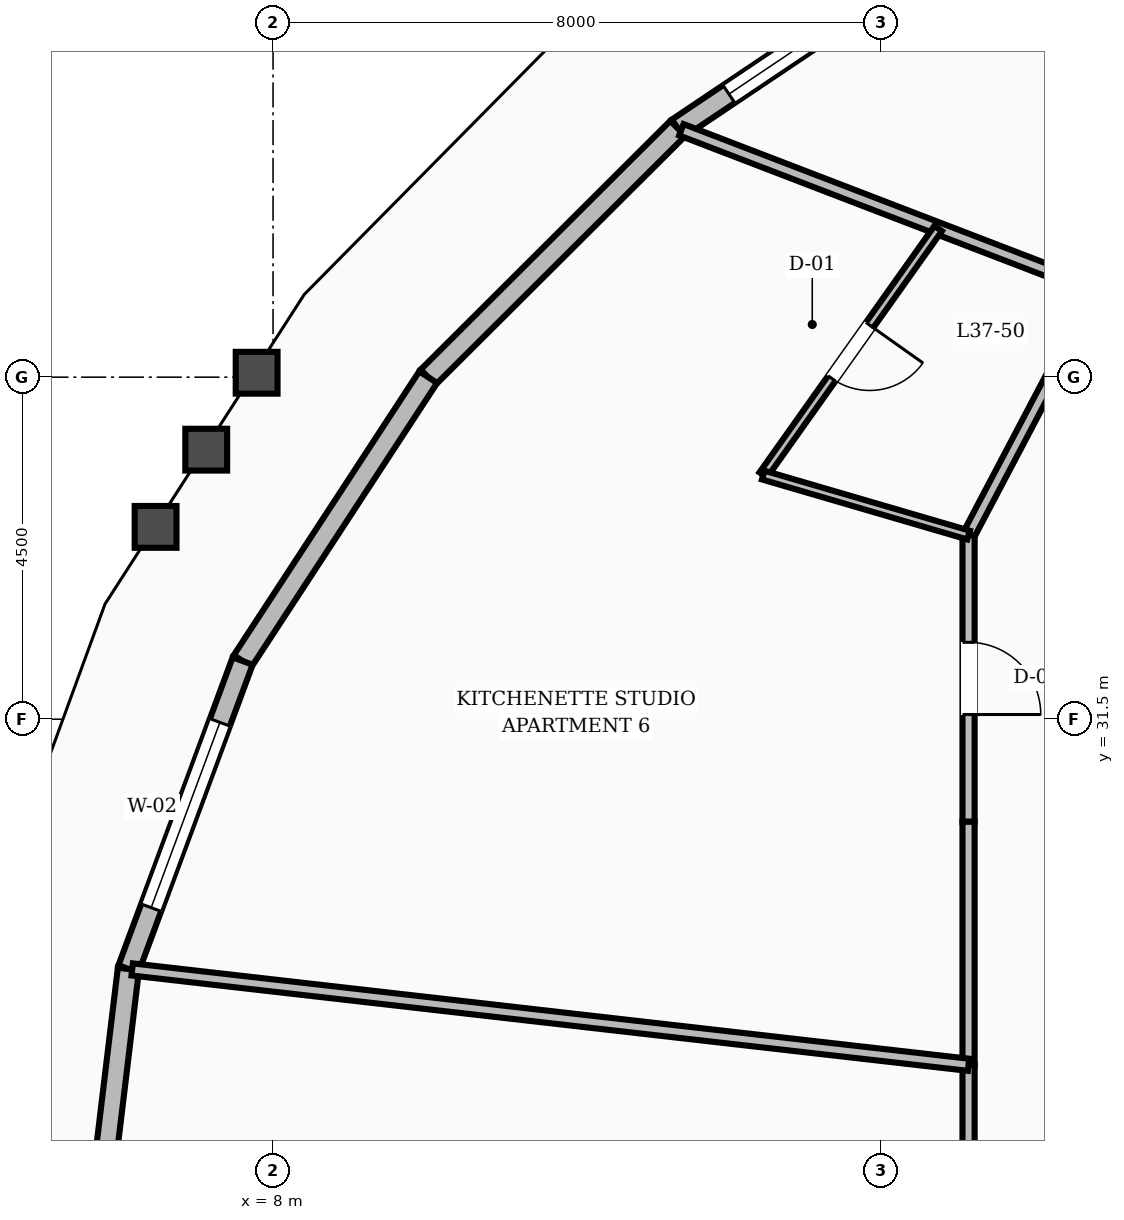
"""IFC4 building model, lengths in metres.
Left out: names, types, materials, properties, quantities, classifications, styles, units other than length and angle.
Written with IfcOpenShell. Run it as: python <this file> out.ifc"""

import sys

from ifc_helpers import new_model, si_unit, direction, frame, frame_2d, origin, place, context, subcontext, project, spatial, rectangle, extrude, element, fill, save


model = new_model("IFC4")
c1 = context("Model", 3, precision=1e-05, world=origin(), true_north=direction((0.0, 1.0)))
c2 = subcontext(c1, "Body", "Model", "MODEL_VIEW")
j1 = project(units=[si_unit("LENGTHUNIT", "METRE"), si_unit("PLANEANGLEUNIT", "RADIAN")], contexts=[c1])
p1 = place(None, origin())
s1 = spatial("IfcSite", under=j1, at=p1, CompositionType="ELEMENT")
p2 = place(p1, origin())
s2 = spatial("IfcBuilding", under=s1, at=p2, CompositionType="ELEMENT")
p3 = place(p2, frame((0.0, 0.0, 146.0)))
s3 = spatial("IfcBuildingStorey", under=s2, at=p3, CompositionType="ELEMENT", Elevation=146.0)
p4 = place(p3, frame((17.327, 41.959, 0.0), z_axis=(0.0, 0.0, 1.0), x_axis=(-0.830308520581, -0.557304010977, 0.0)))
e1 = element("IfcWall", 1, at=p4, inside=s3, PredefinedType="STANDARD", context=c2, shape_type="SweptSolid", body=[
    extrude(rectangle(XDim=4.82, YDim=0.28, at=frame_2d((2.41, 0.0))), origin(), (0.0, 0.0, 1.0), 2.82),
])
p5 = place(p4, frame((0.81, 0.0, 0.8)))
e2 = element("IfcOpeningElement", 2, at=p5, cuts=e1, PredefinedType="OPENING", context=c2, shape_type="SweptSolid", body=[
    extrude(rectangle(XDim=3.2, YDim=1.65, at=frame_2d((1.6, 0.825))), frame((0.0, 0.15, 0.0), z_axis=(0.0, -1.0, 0.0), x_axis=(1.0, 0.0, 0.0)), (0.0, 0.0, 1.0), 0.3),
])
p6 = place(p3, frame((13.325, 39.273, 0.0), z_axis=(0.0, 0.0, 1.0), x_axis=(-0.708343047993, -0.70586834917, 0.0)))
e3 = element("IfcWall", 3, at=p6, inside=s3, PredefinedType="STANDARD", context=c2, shape_type="SweptSolid", body=[
    extrude(rectangle(XDim=4.637, YDim=0.28, at=frame_2d((2.318, 0.0))), origin(), (0.0, 0.0, 1.0), 2.82),
])
p7 = place(p3, frame((10.041, 36.0, 0.0), z_axis=(0.0, 0.0, 1.0), x_axis=(-0.547087162156, -0.837075645927, 0.0)))
e4 = element("IfcWall", 4, at=p7, inside=s3, PredefinedType="STANDARD", context=c2, shape_type="SweptSolid", body=[
    extrude(rectangle(XDim=4.461, YDim=0.28, at=frame_2d((2.23, 0.0))), origin(), (0.0, 0.0, 1.0), 2.82),
])
p8 = place(p3, frame((7.6, 32.266, 0.0), z_axis=(0.0, 0.0, 1.0), x_axis=(-0.347777987911, -0.937576914778, 0.0)))
e5 = element("IfcWall", 5, at=p8, inside=s3, PredefinedType="STANDARD", context=c2, shape_type="SweptSolid", body=[
    extrude(rectangle(XDim=4.322, YDim=0.28, at=frame_2d((2.161, 0.0))), origin(), (0.0, 0.0, 1.0), 2.82),
])
p9 = place(p8, frame((0.861, 0.0, 0.8)))
e6 = element("IfcOpeningElement", 6, at=p9, cuts=e5, PredefinedType="OPENING", context=c2, shape_type="SweptSolid", body=[
    extrude(rectangle(XDim=2.6, YDim=1.65, at=frame_2d((1.3, 0.825))), frame((0.0, 0.15, 0.0), z_axis=(0.0, -1.0, 0.0), x_axis=(1.0, 0.0, 0.0)), (0.0, 0.0, 1.0), 0.3),
])
p10 = place(p3, frame((6.097, 28.214, 0.0), z_axis=(0.0, 0.0, 1.0), x_axis=(-0.119530808936, -0.992830491935, 0.0)))
e7 = element("IfcWall", 7, at=p10, inside=s3, PredefinedType="STANDARD", context=c2, shape_type="SweptSolid", body=[
    extrude(rectangle(XDim=4.244, YDim=0.28, at=frame_2d((2.122, 0.0))), origin(), (0.0, 0.0, 1.0), 2.82),
])
p11 = place(p3, frame((18.85, 37.15, 0.0), z_axis=(0.0, 0.0, 1.0), x_axis=(-0.466093963429, -0.884735224378, 0.0)))
e8 = element("IfcWall", 8, at=p11, inside=s3, PredefinedType="SOLIDWALL", context=c2, shape_type="SweptSolid", body=[
    extrude(rectangle(XDim=3.648, YDim=0.16, at=frame_2d((1.824, 0.0))), origin(), (0.0, 0.0, 1.0), 2.8),
])
p12 = place(p3, frame((17.15, 33.923, 0.0), z_axis=(0.0, 0.0, 1.0), x_axis=(0.0, -1.0, 0.0)))
e9 = element("IfcWall", 9, at=p12, inside=s3, PredefinedType="SOLIDWALL", context=c2, shape_type="SweptSolid", body=[
    extrude(rectangle(XDim=3.771, YDim=0.16, at=frame_2d((1.886, 0.0))), origin(), (0.0, 0.0, 1.0), 2.8),
])
p13 = place(p12, frame((1.411, 0.0, 0.0)))
e10 = element("IfcOpeningElement", 10, at=p13, cuts=e9, PredefinedType="OPENING", context=c2, shape_type="SweptSolid", body=[
    extrude(rectangle(XDim=0.95, YDim=2.1, at=frame_2d((0.475, 1.05))), frame((0.0, 0.09, 0.0), z_axis=(0.0, -1.0, 0.0), x_axis=(1.0, 0.0, 0.0)), (0.0, 0.0, 1.0), 0.18),
])
p14 = place(p3, frame((17.15, 30.151, 0.0), z_axis=(0.0, 0.0, 1.0), x_axis=(0.0, -1.0, 0.0)))
e11 = element("IfcWall", 11, at=p14, inside=s3, PredefinedType="SOLIDWALL", context=c2, shape_type="SweptSolid", body=[
    extrude(rectangle(XDim=3.197, YDim=0.16, at=frame_2d((1.599, 0.0))), origin(), (0.0, 0.0, 1.0), 2.8),
])
p15 = place(p3, frame((17.15, 26.954, 0.0), z_axis=(0.0, 0.0, 1.0), x_axis=(0.0, -1.0, 0.0)))
e12 = element("IfcWall", 12, at=p15, inside=s3, PredefinedType="SOLIDWALL", context=c2, shape_type="SweptSolid", body=[
    extrude(rectangle(XDim=2.954, YDim=0.16, at=frame_2d((1.477, 0.0))), origin(), (0.0, 0.0, 1.0), 2.8),
])
p16 = place(p3, frame((18.85, 37.15, 0.0), z_axis=(0.0, 0.0, 1.0), x_axis=(-0.933453846584, 0.358697527589, 0.0)))
e13 = element("IfcWall", 13, at=p16, inside=s3, PredefinedType="SOLIDWALL", context=c2, shape_type="SweptSolid", body=[
    extrude(rectangle(XDim=5.869, YDim=0.16, at=frame_2d((2.935, 0.0))), origin(), (0.0, 0.0, 1.0), 2.8),
])
p17 = place(p3, frame((16.75, 37.957, 0.0), z_axis=(0.0, 0.0, 1.0), x_axis=(-0.57861140021, -0.81560336411, 0.0)))
e14 = element("IfcWall", 14, at=p17, inside=s3, PredefinedType="PARTITIONING", context=c2, shape_type="SweptSolid", body=[
    extrude(rectangle(XDim=3.979, YDim=0.12, at=frame_2d((1.989, 0.0))), origin(), (0.0, 0.0, 1.0), 2.8),
])
p18 = place(p17, frame((1.559, 0.0, 0.0)))
e15 = element("IfcOpeningElement", 15, at=p18, cuts=e14, PredefinedType="OPENING", context=c2, shape_type="SweptSolid", body=[
    extrude(rectangle(XDim=0.86, YDim=2.1, at=frame_2d((0.43, 1.05))), frame((0.0, 0.07, 0.0), z_axis=(0.0, -1.0, 0.0), x_axis=(1.0, 0.0, 0.0)), (0.0, 0.0, 1.0), 0.14),
])
p19 = place(p3, frame((17.15, 33.923, 0.0), z_axis=(0.0, 0.0, 1.0), x_axis=(-0.959866785373, 0.280456332319, 0.0)))
e16 = element("IfcWall", 16, at=p19, inside=s3, PredefinedType="PARTITIONING", context=c2, shape_type="SweptSolid", body=[
    extrude(rectangle(XDim=2.814, YDim=0.12, at=frame_2d((1.407, 0.0))), origin(), (0.0, 0.0, 1.0), 2.8),
])
p20 = place(p3, frame((17.15, 26.954, 0.0), z_axis=(0.0, 0.0, 1.0), x_axis=(-0.993566806102, 0.113247524528, 0.0)))
e17 = element("IfcWall", 17, at=p20, inside=s3, PredefinedType="SOLIDWALL", context=c2, shape_type="SweptSolid", body=[
    extrude(rectangle(XDim=11.074, YDim=0.16, at=frame_2d((5.537, 0.0))), origin(), (0.0, 0.0, 1.0), 2.8),
])
p21 = place(p5, origin())
e18 = element("IfcWindow", 18, at=p21, inside=s3, PartitioningType="SINGLE_PANEL", PredefinedType="WINDOW", context=c2, shape_type="SweptSolid", body=[
    extrude(rectangle(XDim=3.2, YDim=1.65, at=frame_2d((1.6, 0.825))), frame((0.0, 0.03, 0.0), z_axis=(0.0, -1.0, 0.0), x_axis=(1.0, 0.0, 0.0)), (0.0, 0.0, 1.0), 0.06),
])
fill(e2, e18)
p22 = place(p9, origin())
e19 = element("IfcWindow", 19, at=p22, inside=s3, PartitioningType="SINGLE_PANEL", PredefinedType="WINDOW", context=c2, shape_type="SweptSolid", body=[
    extrude(rectangle(XDim=2.6, YDim=1.65, at=frame_2d((1.3, 0.825))), frame((0.0, 0.03, 0.0), z_axis=(0.0, -1.0, 0.0), x_axis=(1.0, 0.0, 0.0)), (0.0, 0.0, 1.0), 0.06),
])
fill(e6, e19)
p23 = place(p18, origin())
e20 = element("IfcDoor", 20, at=p23, inside=s3, OperationType="SINGLE_SWING_LEFT", PredefinedType="DOOR", context=c2, shape_type="SweptSolid", body=[
    extrude(rectangle(XDim=0.86, YDim=2.1, at=frame_2d((0.43, 1.05))), frame((0.0, 0.025, 0.0), z_axis=(0.0, -1.0, 0.0), x_axis=(1.0, 0.0, 0.0)), (0.0, 0.0, 1.0), 0.05),
])
fill(e15, e20)
p24 = place(p13, origin())
e21 = element("IfcDoor", 21, at=p24, inside=s3, OperationType="SINGLE_SWING_RIGHT", PredefinedType="DOOR", context=c2, shape_type="SweptSolid", body=[
    extrude(rectangle(XDim=0.95, YDim=2.1, at=frame_2d((0.475, 1.05))), frame((0.0, 0.025, 0.0), z_axis=(0.0, -1.0, 0.0), x_axis=(1.0, 0.0, 0.0)), (0.0, 0.0, 1.0), 0.05),
])
fill(e10, e21)
save(model, sys.argv[1])
